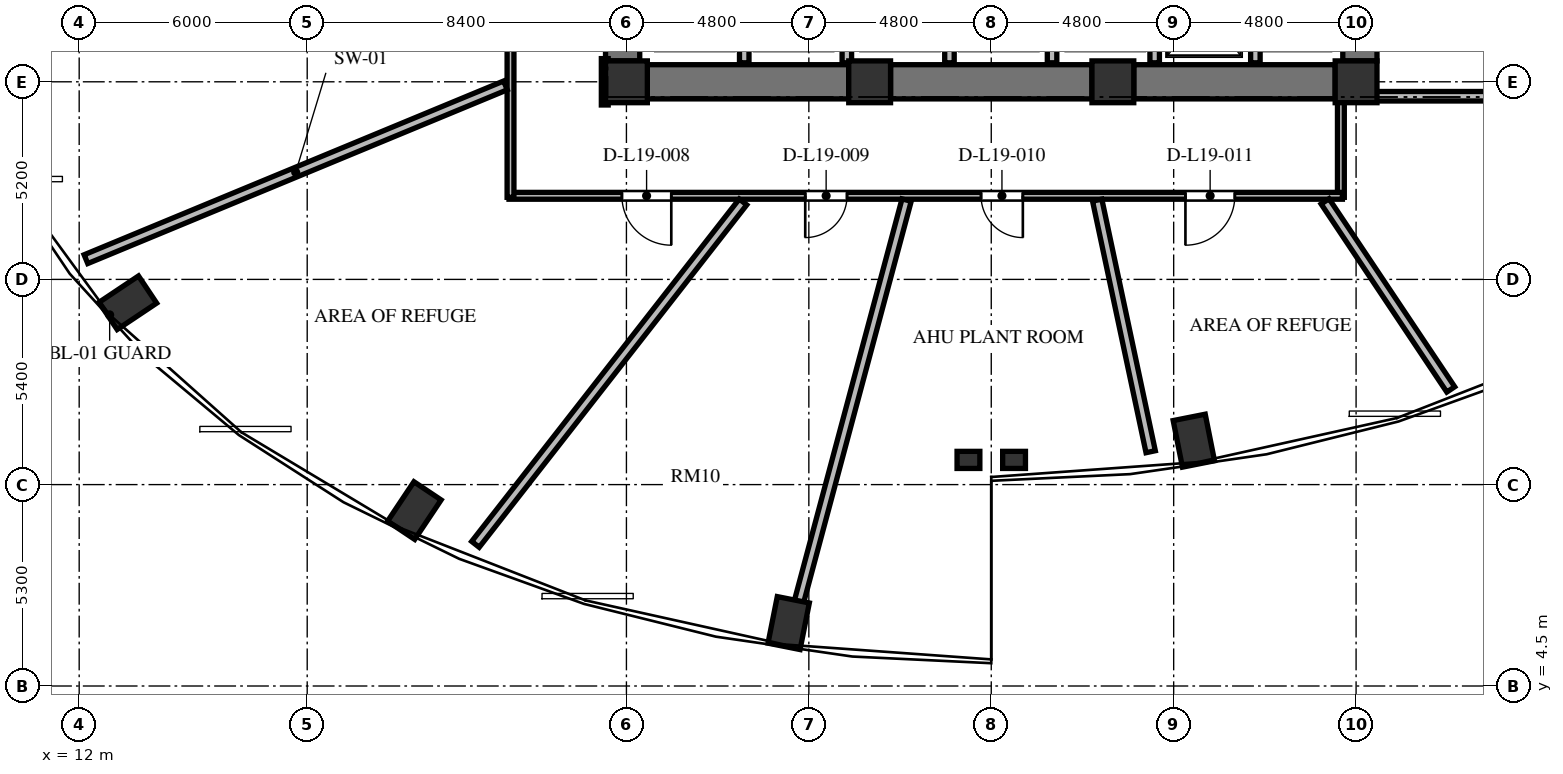
"""IFC4 building model, lengths in metres.
Left out: names, types, materials, properties, quantities, classifications, styles, units other than length and angle.
Written with IfcOpenShell. Run it as: python <this file> out.ifc"""

import sys

from ifc_helpers import new_model, si_unit, direction, frame, frame_2d, origin, origin_2d, place, context, subcontext, project, spatial, rectangle, extrude, element, fill, save


model = new_model("IFC4")
c1 = context("Model", 3, precision=1e-05, world=origin(), true_north=direction((0.0, 1.0)))
c2 = subcontext(c1, "Body", "Model", "MODEL_VIEW")
j1 = project(units=[si_unit("LENGTHUNIT", "METRE"), si_unit("PLANEANGLEUNIT", "RADIAN")], contexts=[c1])
p1 = place(None, origin())
s1 = spatial("IfcSite", under=j1, at=p1, CompositionType="ELEMENT")
p2 = place(p1, origin())
s2 = spatial("IfcBuilding", under=s1, at=p2, CompositionType="ELEMENT")
p3 = place(p2, frame((0.0, 0.0, 76.272)))
s3 = spatial("IfcBuildingStorey", under=s2, at=p3, CompositionType="ELEMENT", Elevation=76.272)
for number, where, z_axis, x_axis in (
    (1, (41.331, 10.956, 0.0), (0.0, 0.0, 1.0), (0.195, -0.981, 0.0)),
    (2, (13.28, 14.586, 0.0), (0.0, 0.0, 1.0), (-0.831, -0.556, 0.0)),
    (3, (20.819, 9.116, 0.0), (0.0, 0.0, 1.0), (-0.556, -0.831, 0.0)),
    (4, (30.669, 6.156, 0.0), (0.0, 0.0, 1.0), (-0.195, -0.981, 0.0)),
):
    element("IfcColumn", number, at=place(p3, frame(where, z_axis=z_axis, x_axis=x_axis)), inside=s3, PredefinedType="COLUMN", context=c2, shape_type="SweptSolid", body=[
        extrude(rectangle(XDim=1.25, YDim=0.86, at=origin_2d()), origin(), (0.0, 0.0, 1.0), 5.472),
    ])
for number, where, z_axis, x_axis in (
    (5, (26.4, 20.4, 0.0), (0.0, 0.0, 1.0), (1.0, 0.0, 0.0)),
    (6, (32.8, 20.4, 0.0), (0.0, 0.0, 1.0), (1.0, 0.0, 0.0)),
    (7, (39.2, 20.4, 0.0), (0.0, 0.0, 1.0), (1.0, 0.0, 0.0)),
    (8, (45.6, 20.4, 0.0), (0.0, 0.0, 1.0), (1.0, 0.0, 0.0)),
):
    element("IfcColumn", number, at=place(p3, frame(where, z_axis=z_axis, x_axis=x_axis)), inside=s3, PredefinedType="COLUMN", context=c2, shape_type="SweptSolid", body=[
        extrude(rectangle(XDim=1.1, YDim=1.1, at=origin_2d()), origin(), (0.0, 0.0, 1.0), 5.472),
    ])
for number, where, z_axis, x_axis in (
    (9, (35.4, 10.45, 0.0), (0.0, 0.0, 1.0), (1.0, 0.0, 0.0)),
    (10, (36.6, 10.45, 0.0), (0.0, 0.0, 1.0), (1.0, 0.0, 0.0)),
):
    element("IfcColumn", number, at=place(p3, frame(where, z_axis=z_axis, x_axis=x_axis)), inside=s3, PredefinedType="PILASTER", context=c2, shape_type="SweptSolid", body=[
        extrude(rectangle(XDim=0.6, YDim=0.45, at=origin_2d()), origin(), (0.0, 0.0, 1.0), 5.472),
    ])
p4 = place(p3, frame((26.3, 20.95, 0.0), z_axis=(0.0, 0.0, 1.0), x_axis=(0.0, 1.0, 0.0)))
e11 = element("IfcWall", 11, at=p4, inside=s3, PredefinedType="SHEAR", context=c2, shape_type="SweptSolid", body=[
    extrude(rectangle(XDim=14.1, YDim=0.9, at=frame_2d((7.05, 0.0))), origin(), (0.0, 0.0, 1.0), 5.472),
])
p5 = place(p4, frame((6.5, 0.0, 0.0)))
e12 = element("IfcOpeningElement", 12, at=p5, cuts=e11, PredefinedType="OPENING", context=c2, shape_type="SweptSolid", body=[
    extrude(rectangle(XDim=1.2, YDim=2.15, at=frame_2d((0.6, 1.075))), frame((0.0, 0.46, 0.0), z_axis=(0.0, -1.0, 0.0), x_axis=(1.0, 0.0, 0.0)), (0.0, 0.0, 1.0), 0.92),
])
p6 = place(p4, frame((9.6, 0.0, 0.0)))
e13 = element("IfcOpeningElement", 13, at=p6, cuts=e11, PredefinedType="OPENING", context=c2, shape_type="SweptSolid", body=[
    extrude(rectangle(XDim=1.3, YDim=2.2, at=frame_2d((0.65, 1.1))), frame((0.0, 0.46, 0.0), z_axis=(0.0, -1.0, 0.0), x_axis=(1.0, 0.0, 0.0)), (0.0, 0.0, 1.0), 0.92),
])
p7 = place(p4, frame((3.26, 0.0, 0.0)))
e14 = element("IfcOpeningElement", 14, at=p7, cuts=e11, PredefinedType="OPENING", context=c2, shape_type="SweptSolid", body=[
    extrude(rectangle(XDim=1.3, YDim=2.2, at=frame_2d((0.65, 1.1))), frame((0.0, 0.46, 0.0), z_axis=(0.0, -1.0, 0.0), x_axis=(1.0, 0.0, 0.0)), (0.0, 0.0, 1.0), 0.92),
])
p8 = place(p3, frame((45.7, 20.95, 0.0), z_axis=(0.0, 0.0, 1.0), x_axis=(0.0, 1.0, 0.0)))
e15 = element("IfcWall", 15, at=p8, inside=s3, PredefinedType="SHEAR", context=c2, shape_type="SweptSolid", body=[
    extrude(rectangle(XDim=14.1, YDim=0.9, at=frame_2d((7.05, 0.0))), origin(), (0.0, 0.0, 1.0), 5.472),
])
p9 = place(p8, frame((11.75, 0.0, 0.0)))
e16 = element("IfcOpeningElement", 16, at=p9, cuts=e15, PredefinedType="OPENING", context=c2, shape_type="SweptSolid", body=[
    extrude(rectangle(XDim=1.4, YDim=2.3, at=frame_2d((0.7, 1.15))), frame((0.0, 0.46, 0.0), z_axis=(0.0, -1.0, 0.0), x_axis=(1.0, 0.0, 0.0)), (0.0, 0.0, 1.0), 0.92),
])
p10 = place(p8, frame((0.95, 0.0, 0.0)))
e17 = element("IfcOpeningElement", 17, at=p10, cuts=e15, PredefinedType="OPENING", context=c2, shape_type="SweptSolid", body=[
    extrude(rectangle(XDim=1.4, YDim=2.3, at=frame_2d((0.7, 1.15))), frame((0.0, 0.46, 0.0), z_axis=(0.0, -1.0, 0.0), x_axis=(1.0, 0.0, 0.0)), (0.0, 0.0, 1.0), 0.92),
])
p11 = place(p3, frame((26.95, 20.4, 0.0), z_axis=(0.0, 0.0, 1.0), x_axis=(1.0, 0.0, 0.0)))
e18 = element("IfcWall", 18, at=p11, inside=s3, PredefinedType="SHEAR", context=c2, shape_type="SweptSolid", body=[
    extrude(rectangle(XDim=5.3, YDim=0.9, at=frame_2d((2.65, 0.0))), origin(), (0.0, 0.0, 1.0), 5.472),
])
p12 = place(p3, frame((33.35, 20.4, 0.0), z_axis=(0.0, 0.0, 1.0), x_axis=(1.0, 0.0, 0.0)))
e19 = element("IfcWall", 19, at=p12, inside=s3, PredefinedType="SHEAR", context=c2, shape_type="SweptSolid", body=[
    extrude(rectangle(XDim=5.3, YDim=0.9, at=frame_2d((2.65, 0.0))), origin(), (0.0, 0.0, 1.0), 5.472),
])
p13 = place(p3, frame((39.75, 20.4, 0.0), z_axis=(0.0, 0.0, 1.0), x_axis=(1.0, 0.0, 0.0)))
e20 = element("IfcWall", 20, at=p13, inside=s3, PredefinedType="SHEAR", context=c2, shape_type="SweptSolid", body=[
    extrude(rectangle(XDim=5.3, YDim=0.9, at=frame_2d((2.65, 0.0))), origin(), (0.0, 0.0, 1.0), 5.472),
])
p14 = place(p3, frame((42.95, 20.9, 0.0), z_axis=(0.0, 0.0, 1.0), x_axis=(0.0, 1.0, 0.0)))
e21 = element("IfcWall", 21, at=p14, inside=s3, PredefinedType="SOLIDWALL", context=c2, shape_type="SweptSolid", body=[
    extrude(rectangle(XDim=3.2, YDim=0.25, at=frame_2d((1.6, 0.0))), origin(), (0.0, 0.0, 1.0), 5.022),
])
for number, where, z_axis, x_axis in (
    (22, (29.5, 20.9, 0.0), (0.0, 0.0, 1.0), (0.0, 1.0, 0.0)),
    (23, (32.2, 20.9, 0.0), (0.0, 0.0, 1.0), (0.0, 1.0, 0.0)),
    (24, (34.9, 20.9, 0.0), (0.0, 0.0, 1.0), (0.0, 1.0, 0.0)),
    (25, (37.6, 20.9, 0.0), (0.0, 0.0, 1.0), (0.0, 1.0, 0.0)),
    (26, (40.3, 20.9, 0.0), (0.0, 0.0, 1.0), (0.0, 1.0, 0.0)),
):
    element("IfcWall", number, at=place(p3, frame(where, z_axis=z_axis, x_axis=x_axis)), inside=s3, PredefinedType="SOLIDWALL", context=c2, shape_type="SweptSolid", body=[
        extrude(rectangle(XDim=2.8, YDim=0.25, at=frame_2d((1.4, 0.0))), origin(), (0.0, 0.0, 1.0), 5.022),
    ])
p15 = place(p3, frame((45.7, 20.02, 0.0), z_axis=(0.0, 0.0, 1.0), x_axis=(1.0, 0.0, 0.0)))
e27 = element("IfcWall", 27, at=p15, inside=s3, PredefinedType="SOLIDWALL", context=c2, shape_type="SweptSolid", body=[
    extrude(rectangle(XDim=4.715, YDim=0.25, at=frame_2d((2.357, 0.0))), origin(), (0.0, 0.0, 1.0), 3.607),
])
p16 = place(p3, frame((25.83, 21.01, 0.0), z_axis=(0.0, 0.0, 1.0), x_axis=(0.0, -1.0, 0.0)))
e28 = element("IfcWall", 28, at=p16, inside=s3, PredefinedType="PARTITIONING", context=c2, shape_type="SweptSolid", body=[
    extrude(rectangle(XDim=1.22, YDim=0.18, at=frame_2d((0.61, 0.0))), origin(), (0.0, 0.0, 1.0), 5.022),
])
p17 = place(p3, frame((45.2, 19.91, 0.0), z_axis=(0.0, 0.0, 1.0), x_axis=(0.0, -1.0, 0.0)))
e29 = element("IfcWall", 29, at=p17, inside=s3, PredefinedType="PARTITIONING", context=c2, shape_type="SweptSolid", body=[
    extrude(rectangle(XDim=2.55, YDim=0.18, at=frame_2d((1.275, 0.0))), origin(), (0.0, 0.0, 1.0), 5.022),
])
p18 = place(p3, frame((45.24, 17.4, 0.0), z_axis=(0.0, 0.0, 1.0), x_axis=(-1.0, 0.0, 0.0)))
e30 = element("IfcWall", 30, at=p18, inside=s3, PredefinedType="PARTITIONING", context=c2, shape_type="SweptSolid", body=[
    extrude(rectangle(XDim=21.93, YDim=0.18, at=frame_2d((10.965, 0.0))), origin(), (0.0, 0.0, 1.0), 4.647),
])
p19 = place(p18, frame((17.659, 0.0, 0.0)))
e31 = element("IfcOpeningElement", 31, at=p19, cuts=e30, PredefinedType="OPENING", context=c2, shape_type="SweptSolid", body=[
    extrude(rectangle(XDim=1.3, YDim=2.2, at=frame_2d((0.65, 1.1))), frame((0.0, 0.1, 0.0), z_axis=(0.0, -1.0, 0.0), x_axis=(1.0, 0.0, 0.0)), (0.0, 0.0, 1.0), 0.2),
])
p20 = place(p18, frame((13.035, 0.0, 0.0)))
e32 = element("IfcOpeningElement", 32, at=p20, cuts=e30, PredefinedType="OPENING", context=c2, shape_type="SweptSolid", body=[
    extrude(rectangle(XDim=1.1, YDim=2.15, at=frame_2d((0.55, 1.075))), frame((0.0, 0.1, 0.0), z_axis=(0.0, -1.0, 0.0), x_axis=(1.0, 0.0, 0.0)), (0.0, 0.0, 1.0), 0.2),
])
p21 = place(p18, frame((8.409, 0.0, 0.0)))
e33 = element("IfcOpeningElement", 33, at=p21, cuts=e30, PredefinedType="OPENING", context=c2, shape_type="SweptSolid", body=[
    extrude(rectangle(XDim=1.1, YDim=2.15, at=frame_2d((0.55, 1.075))), frame((0.0, 0.1, 0.0), z_axis=(0.0, -1.0, 0.0), x_axis=(1.0, 0.0, 0.0)), (0.0, 0.0, 1.0), 0.2),
])
p22 = place(p18, frame((2.831, 0.0, 0.0)))
e34 = element("IfcOpeningElement", 34, at=p22, cuts=e30, PredefinedType="OPENING", context=c2, shape_type="SweptSolid", body=[
    extrude(rectangle(XDim=1.3, YDim=2.2, at=frame_2d((0.65, 1.1))), frame((0.0, 0.1, 0.0), z_axis=(0.0, -1.0, 0.0), x_axis=(1.0, 0.0, 0.0)), (0.0, 0.0, 1.0), 0.2),
])
p23 = place(p3, frame((23.35, 17.36, 0.0), z_axis=(0.0, 0.0, 1.0), x_axis=(0.0, 1.0, 0.0)))
e35 = element("IfcWall", 35, at=p23, inside=s3, PredefinedType="PARTITIONING", context=c2, shape_type="SweptSolid", body=[
    extrude(rectangle(XDim=9.28, YDim=0.18, at=frame_2d((4.64, 0.0))), origin(), (0.0, 0.0, 1.0), 5.022),
])
p24 = place(p3, frame((38.787, 17.286, 0.0), z_axis=(0.0, 0.0, 1.0), x_axis=(0.207927773238, -0.978144182172, 0.0)))
e36 = element("IfcWall", 36, at=p24, inside=s3, PredefinedType="SOLIDWALL", context=c2, shape_type="SweptSolid", body=[
    extrude(rectangle(XDim=6.769, YDim=0.25, at=frame_2d((3.385, 0.0))), origin(), (0.0, 0.0, 1.0), 5.022),
])
p25 = place(p3, frame((44.784, 17.253, 0.0), z_axis=(0.0, 0.0, 1.0), x_axis=(0.555580181492, -0.83146296486, 0.0)))
e37 = element("IfcWall", 37, at=p25, inside=s3, PredefinedType="SOLIDWALL", context=c2, shape_type="SweptSolid", body=[
    extrude(rectangle(XDim=5.952, YDim=0.25, at=frame_2d((2.976, 0.0))), origin(), (0.0, 0.0, 1.0), 5.022),
])
p26 = place(p3, frame((23.217, 20.305, 0.0), z_axis=(0.0, 0.0, 1.0), x_axis=(-0.923880113583, -0.382682029531, 0.0)))
e38 = element("IfcWall", 38, at=p26, inside=s3, PredefinedType="SOLIDWALL", context=c2, shape_type="SweptSolid", body=[
    extrude(rectangle(XDim=11.948, YDim=0.25, at=frame_2d((5.974, 0.0))), origin(), (0.0, 0.0, 1.0), 5.022),
])
p27 = place(p3, frame((29.467, 17.239, 0.0), z_axis=(0.0, 0.0, 1.0), x_axis=(-0.615655228447, -0.788015634164, 0.0)))
e39 = element("IfcWall", 39, at=p27, inside=s3, PredefinedType="SOLIDWALL", context=c2, shape_type="SweptSolid", body=[
    extrude(rectangle(XDim=11.435, YDim=0.25, at=frame_2d((5.718, 0.0))), origin(), (0.0, 0.0, 1.0), 5.022),
])
p28 = place(p3, frame((33.773, 17.287, 0.0), z_axis=(0.0, 0.0, 1.0), x_axis=(-0.258838592599, -0.965920588341, 0.0)))
e40 = element("IfcWall", 40, at=p28, inside=s3, PredefinedType="SOLIDWALL", context=c2, shape_type="SweptSolid", body=[
    extrude(rectangle(XDim=11.667, YDim=0.25, at=frame_2d((5.833, 0.0))), origin(), (0.0, 0.0, 1.0), 3.607),
])
p29 = place(p19, origin())
e41 = element("IfcDoor", 41, at=p29, inside=s3, OperationType="SINGLE_SWING_LEFT", PredefinedType="DOOR", context=c2, shape_type="SweptSolid", body=[
    extrude(rectangle(XDim=1.3, YDim=2.2, at=frame_2d((0.65, 1.1))), frame((0.0, 0.025, 0.0), z_axis=(0.0, -1.0, 0.0), x_axis=(1.0, 0.0, 0.0)), (0.0, 0.0, 1.0), 0.05),
])
fill(e31, e41)
p30 = place(p20, origin())
e42 = element("IfcDoor", 42, at=p30, inside=s3, OperationType="SINGLE_SWING_RIGHT", PredefinedType="DOOR", context=c2, shape_type="SweptSolid", body=[
    extrude(rectangle(XDim=1.1, YDim=2.15, at=frame_2d((0.55, 1.075))), frame((0.0, 0.025, 0.0), z_axis=(0.0, -1.0, 0.0), x_axis=(1.0, 0.0, 0.0)), (0.0, 0.0, 1.0), 0.05),
])
fill(e32, e42)
p31 = place(p21, origin())
e43 = element("IfcDoor", 43, at=p31, inside=s3, OperationType="SINGLE_SWING_LEFT", PredefinedType="DOOR", context=c2, shape_type="SweptSolid", body=[
    extrude(rectangle(XDim=1.1, YDim=2.15, at=frame_2d((0.55, 1.075))), frame((0.0, 0.025, 0.0), z_axis=(0.0, -1.0, 0.0), x_axis=(1.0, 0.0, 0.0)), (0.0, 0.0, 1.0), 0.05),
])
fill(e33, e43)
p32 = place(p22, origin())
e44 = element("IfcDoor", 44, at=p32, inside=s3, OperationType="SINGLE_SWING_RIGHT", PredefinedType="DOOR", context=c2, shape_type="SweptSolid", body=[
    extrude(rectangle(XDim=1.3, YDim=2.2, at=frame_2d((0.65, 1.1))), frame((0.0, 0.025, 0.0), z_axis=(0.0, -1.0, 0.0), x_axis=(1.0, 0.0, 0.0)), (0.0, 0.0, 1.0), 0.05),
])
fill(e34, e44)
save(model, sys.argv[1])
